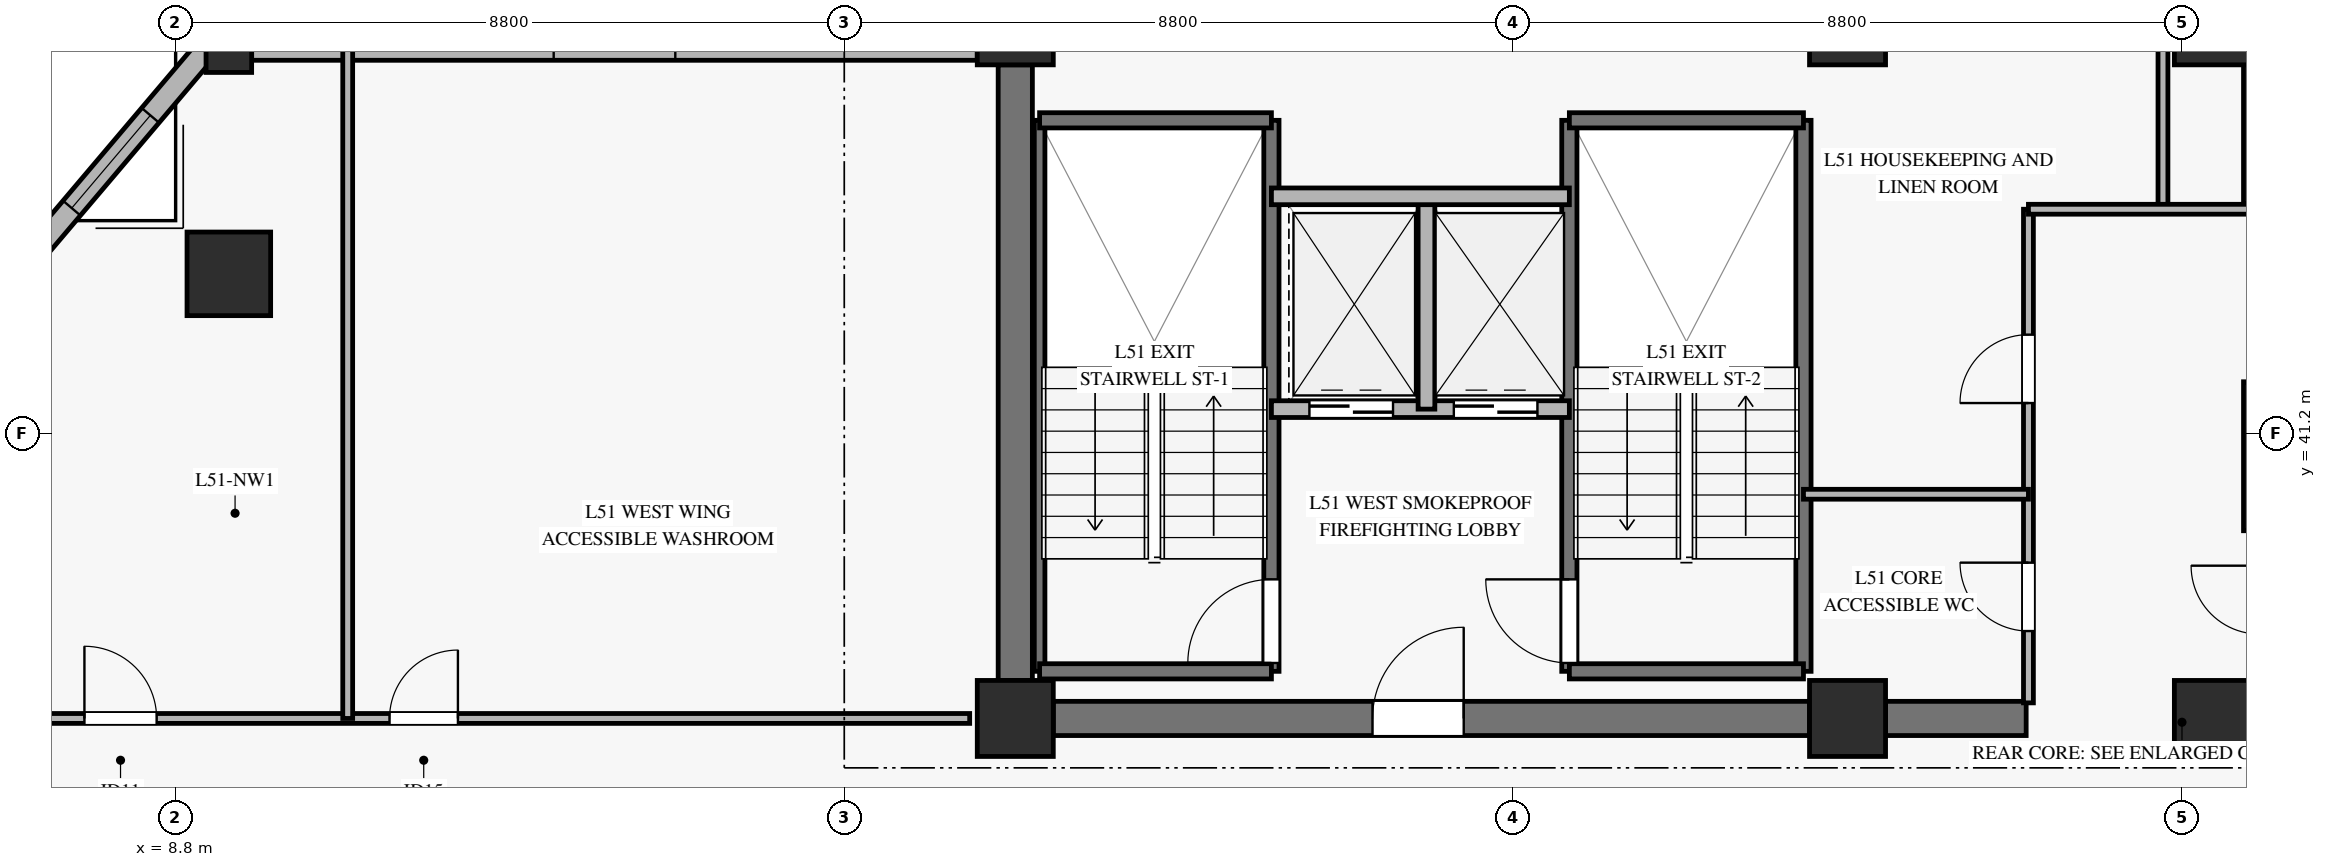
"""IFC4 building model, lengths in metres.
Left out: names, types, materials, properties, quantities, classifications, styles, units other than length and angle.
Written with IfcOpenShell. Run it as: python <this file> out.ifc"""

import sys

from ifc_helpers import new_model, si_unit, direction, frame, frame_2d, origin, origin_2d, place, context, subcontext, project, spatial, rectangle, hollow_rectangle, extrude, source, transform, mapped, element, fill, save


model = new_model("IFC4")
c1 = context("Model", 3, precision=1e-05, world=origin(), true_north=direction((0.0, 1.0)))
c2 = subcontext(c1, "Body", "Model", "MODEL_VIEW")
j1 = project(units=[si_unit("LENGTHUNIT", "METRE"), si_unit("PLANEANGLEUNIT", "RADIAN")], contexts=[c1])
p1 = place(None, origin())
s1 = spatial("IfcSite", under=j1, at=p1, CompositionType="ELEMENT")
p2 = place(p1, origin())
s2 = spatial("IfcBuilding", under=s1, at=p2, CompositionType="ELEMENT")
p3 = place(p2, frame((0.0, 0.0, 202.7)))
s3 = spatial("IfcBuildingStorey", under=s2, at=p3, CompositionType="ELEMENT", Elevation=202.7)
m1 = source(origin(), c2, "Body", "SweptSolid", [
    extrude(rectangle(XDim=1.0, YDim=1.0, at=origin_2d()), origin(), (0.0, 0.0, 1.0), 3.27),
])
for number, where, z_axis, x_axis in (
    (1, (19.85, 37.45, 0.0), (0.0, 0.0, 1.0), (1.0, 0.0, 0.0)),
    (2, (19.85, 46.55, 0.0), (0.0, 0.0, 1.0), (1.0, 0.0, 0.0)),
    (3, (30.8, 37.45, 0.0), (0.0, 0.0, 1.0), (1.0, 0.0, 0.0)),
    (4, (30.8, 46.55, 0.0), (0.0, 0.0, 1.0), (1.0, 0.0, 0.0)),
    (5, (35.6, 37.45, 0.0), (0.0, 0.0, 1.0), (1.0, 0.0, 0.0)),
    (6, (35.6, 46.55, 0.0), (0.0, 0.0, 1.0), (1.0, 0.0, 0.0)),
):
    element("IfcColumn", number, at=place(p3, frame(where, z_axis=z_axis, x_axis=x_axis)), inside=s3, PredefinedType="PILASTER", context=c2, shape_type="MappedRepresentation", body=[
        mapped(m1, transform((0.0, 0.0, 0.0), x_axis=(1.0, 0.0, 0.0), y_axis=(0.0, 1.0, 0.0), z_axis=(0.0, 0.0, 1.0), scale=1.0)),
    ])
p4 = place(p3, frame((20.35, 37.45, 0.0), z_axis=(0.0, 0.0, 1.0), x_axis=(1.0, 0.0, 0.0)))
e7 = element("IfcWall", 7, at=p4, inside=s3, PredefinedType="SHEAR", context=c2, shape_type="SweptSolid", body=[
    extrude(rectangle(XDim=9.95, YDim=0.45, at=frame_2d((4.975, 0.0))), origin(), (0.0, 0.0, 1.0), 3.27),
])
p5 = place(p4, frame((4.2, 0.0, 0.0)))
e8 = element("IfcOpeningElement", 8, at=p5, cuts=e7, PredefinedType="OPENING", context=c2, shape_type="SweptSolid", body=[
    extrude(rectangle(XDim=1.2, YDim=2.15, at=frame_2d((0.6, 1.075))), frame((0.0, 0.235, 0.0), z_axis=(0.0, -1.0, 0.0), x_axis=(1.0, 0.0, 0.0)), (0.0, 0.0, 1.0), 0.47),
])
p6 = place(p3, frame((31.3, 37.45, 0.0), z_axis=(0.0, 0.0, 1.0), x_axis=(1.0, 0.0, 0.0)))
e9 = element("IfcWall", 9, at=p6, inside=s3, PredefinedType="SHEAR", context=c2, shape_type="SweptSolid", body=[
    extrude(rectangle(XDim=1.85, YDim=0.45, at=frame_2d((0.925, 0.0))), origin(), (0.0, 0.0, 1.0), 3.27),
])
p7 = place(p3, frame((19.85, 37.95, 0.0), z_axis=(0.0, 0.0, 1.0), x_axis=(0.0, 1.0, 0.0)))
e10 = element("IfcWall", 10, at=p7, inside=s3, PredefinedType="SHEAR", context=c2, shape_type="SweptSolid", body=[
    extrude(rectangle(XDim=8.1, YDim=0.45, at=frame_2d((4.05, 0.0))), origin(), (0.0, 0.0, 1.0), 3.27),
])
m2 = source(origin(), c2, "Body", "SweptSolid", [
    extrude(hollow_rectangle(XDim=1.1, YDim=1.1, WallThickness=0.05, at=origin_2d()), origin(), (0.0, 0.0, 1.0), 3.27),
])
p8 = place(p3, frame((9.503, 43.3, 0.0), z_axis=(0.0, 0.0, 1.0), x_axis=(1.0, 0.0, 0.0)))
e11 = element("IfcColumn", 11, at=p8, inside=s3, PredefinedType="COLUMN", context=c2, shape_type="MappedRepresentation", body=[
    mapped(m2, transform((0.0, 0.0, 0.0), x_axis=(1.0, 0.0, 0.0), y_axis=(0.0, 1.0, 0.0), z_axis=(0.0, 0.0, 1.0), scale=1.0)),
])
m3 = source(origin(), c2, "Body", "SweptSolid", [
    extrude(hollow_rectangle(XDim=0.6, YDim=0.6, WallThickness=0.028, at=origin_2d()), origin(), (0.0, 0.0, 1.0), 3.27),
])
p9 = place(p3, frame((9.503, 46.25, 0.0), z_axis=(0.0, 0.0, 1.0), x_axis=(1.0, 0.0, 0.0)))
e12 = element("IfcColumn", 12, at=p9, inside=s3, PredefinedType="COLUMN", context=c2, shape_type="MappedRepresentation", body=[
    mapped(m3, transform((0.0, 0.0, 0.0), x_axis=(1.0, 0.0, 0.0), y_axis=(0.0, 1.0, 0.0), z_axis=(0.0, 0.0, 1.0), scale=1.0)),
])
p10 = place(p3, frame((9.803, 46.25, 0.0), z_axis=(0.0, 0.0, 1.0), x_axis=(1.0, 0.0, 0.0)))
e13 = element("IfcWall", 13, at=p10, inside=s3, PredefinedType="SOLIDWALL", context=c2, shape_type="SweptSolid", body=[
    extrude(rectangle(XDim=9.547, YDim=0.28, at=frame_2d((4.773, 0.0))), origin(), (0.0, 0.0, 1.0), 2.75),
])
p11 = place(p10, frame((3.974, 0.0, 0.45)))
e14 = element("IfcOpeningElement", 14, at=p11, cuts=e13, PredefinedType="OPENING", context=c2, shape_type="SweptSolid", body=[
    extrude(rectangle(XDim=1.6, YDim=2.0, at=frame_2d((0.8, 1.0))), frame((0.0, 0.15, 0.0), z_axis=(0.0, -1.0, 0.0), x_axis=(1.0, 0.0, 0.0)), (0.0, 0.0, 1.0), 0.3),
])
p12 = place(p3, frame((9.203, 46.25, 0.0), z_axis=(0.0, 0.0, 1.0), x_axis=(-0.646527923623, -0.762890322377, 0.0)))
e15 = element("IfcWall", 15, at=p12, inside=s3, PredefinedType="SOLIDWALL", context=c2, shape_type="SweptSolid", body=[
    extrude(rectangle(XDim=3.867, YDim=0.3, at=frame_2d((1.933, 0.0))), origin(), (0.0, 0.0, 1.0), 2.75),
])
p13 = place(p12, frame((1.133, 0.0, 0.45)))
e16 = element("IfcOpeningElement", 16, at=p13, cuts=e15, PredefinedType="OPENING", context=c2, shape_type="SweptSolid", body=[
    extrude(rectangle(XDim=1.6, YDim=2.0, at=frame_2d((0.8, 1.0))), frame((0.0, 0.16, 0.0), z_axis=(0.0, -1.0, 0.0), x_axis=(1.0, 0.0, 0.0)), (0.0, 0.0, 1.0), 0.32),
])
p14 = place(p3, frame((20.17, 38.07, 0.0), z_axis=(0.0, 0.0, 1.0), x_axis=(0.0, 1.0, 0.0)))
e17 = element("IfcWall", 17, at=p14, inside=s3, PredefinedType="SOLIDWALL", context=c2, shape_type="SweptSolid", body=[
    extrude(rectangle(XDim=7.25, YDim=0.14, at=frame_2d((3.625, 0.0))), origin(), (0.0, 0.0, 1.0), 3.5),
])
p15 = place(p3, frame((23.22, 38.07, 0.0), z_axis=(0.0, 0.0, 1.0), x_axis=(0.0, 1.0, 0.0)))
e18 = element("IfcWall", 18, at=p15, inside=s3, PredefinedType="SOLIDWALL", context=c2, shape_type="SweptSolid", body=[
    extrude(rectangle(XDim=7.25, YDim=0.2, at=frame_2d((3.625, 0.0))), origin(), (0.0, 0.0, 1.0), 3.5),
])
p16 = place(p15, frame((0.11, 0.0, 0.0)))
e19 = element("IfcOpeningElement", 19, at=p16, cuts=e18, PredefinedType="OPENING", context=c2, shape_type="SweptSolid", body=[
    extrude(rectangle(XDim=1.1, YDim=2.15, at=frame_2d((0.55, 1.075))), frame((0.0, 0.11, 0.0), z_axis=(0.0, -1.0, 0.0), x_axis=(1.0, 0.0, 0.0)), (0.0, 0.0, 1.0), 0.22),
])
for number, where, z_axis, x_axis in (
    (20, (20.17, 45.32, 0.0), (0.0, 0.0, 1.0), (1.0, 0.0, 0.0)),
    (21, (20.17, 38.07, 0.0), (0.0, 0.0, 1.0), (1.0, 0.0, 0.0)),
):
    element("IfcWall", number, at=place(p3, frame(where, z_axis=z_axis, x_axis=x_axis)), inside=s3, PredefinedType="SOLIDWALL", context=c2, shape_type="SweptSolid", body=[
        extrude(rectangle(XDim=3.05, YDim=0.2, at=frame_2d((1.525, 0.0))), origin(), (0.0, 0.0, 1.0), 3.5),
    ])
p17 = place(p3, frame((27.14, 38.07, 0.0), z_axis=(0.0, 0.0, 1.0), x_axis=(0.0, 1.0, 0.0)))
e22 = element("IfcWall", 22, at=p17, inside=s3, PredefinedType="SOLIDWALL", context=c2, shape_type="SweptSolid", body=[
    extrude(rectangle(XDim=7.25, YDim=0.2, at=frame_2d((3.625, 0.0))), origin(), (0.0, 0.0, 1.0), 3.5),
])
p18 = place(p17, frame((0.11, 0.0, 0.0)))
e23 = element("IfcOpeningElement", 23, at=p18, cuts=e22, PredefinedType="OPENING", context=c2, shape_type="SweptSolid", body=[
    extrude(rectangle(XDim=1.1, YDim=2.15, at=frame_2d((0.55, 1.075))), frame((0.0, 0.11, 0.0), z_axis=(0.0, -1.0, 0.0), x_axis=(1.0, 0.0, 0.0)), (0.0, 0.0, 1.0), 0.22),
])
p19 = place(p3, frame((30.22, 38.07, 0.0), z_axis=(0.0, 0.0, 1.0), x_axis=(0.0, 1.0, 0.0)))
e24 = element("IfcWall", 24, at=p19, inside=s3, PredefinedType="SOLIDWALL", context=c2, shape_type="SweptSolid", body=[
    extrude(rectangle(XDim=7.25, YDim=0.2, at=frame_2d((3.625, 0.0))), origin(), (0.0, 0.0, 1.0), 3.5),
])
for number, where, z_axis, x_axis in (
    (25, (27.14, 45.32, 0.0), (0.0, 0.0, 1.0), (1.0, 0.0, 0.0)),
    (26, (27.14, 38.07, 0.0), (0.0, 0.0, 1.0), (1.0, 0.0, 0.0)),
):
    element("IfcWall", number, at=place(p3, frame(where, z_axis=z_axis, x_axis=x_axis)), inside=s3, PredefinedType="SOLIDWALL", context=c2, shape_type="SweptSolid", body=[
        extrude(rectangle(XDim=3.08, YDim=0.2, at=frame_2d((1.54, 0.0))), origin(), (0.0, 0.0, 1.0), 3.5),
    ])
p20 = place(p3, frame((23.22, 41.52, 0.0), z_axis=(0.0, 0.0, 1.0), x_axis=(1.0, 0.0, 0.0)))
e27 = element("IfcWall", 27, at=p20, inside=s3, PredefinedType="SOLIDWALL", context=c2, shape_type="SweptSolid", body=[
    extrude(rectangle(XDim=3.92, YDim=0.22, at=frame_2d((1.96, 0.0))), origin(), (0.0, 0.0, 1.0), 3.27),
])
p21 = place(p20, frame((0.5, 0.0, 0.0)))
e28 = element("IfcOpeningElement", 28, at=p21, cuts=e27, PredefinedType="OPENING", context=c2, shape_type="SweptSolid", body=[
    extrude(rectangle(XDim=1.1, YDim=2.2, at=frame_2d((0.55, 1.1))), frame((0.0, 0.12, 0.0), z_axis=(0.0, -1.0, 0.0), x_axis=(1.0, 0.0, 0.0)), (0.0, 0.0, 1.0), 0.24),
])
p22 = place(p20, frame((2.4, 0.0, 0.0)))
e29 = element("IfcOpeningElement", 29, at=p22, cuts=e27, PredefinedType="OPENING", context=c2, shape_type="SweptSolid", body=[
    extrude(rectangle(XDim=1.1, YDim=2.2, at=frame_2d((0.55, 1.1))), frame((0.0, 0.12, 0.0), z_axis=(0.0, -1.0, 0.0), x_axis=(1.0, 0.0, 0.0)), (0.0, 0.0, 1.0), 0.24),
])
p23 = place(p3, frame((25.26, 41.52, 0.0), z_axis=(0.0, 0.0, 1.0), x_axis=(0.0, 1.0, 0.0)))
e30 = element("IfcWall", 30, at=p23, inside=s3, PredefinedType="SOLIDWALL", context=c2, shape_type="SweptSolid", body=[
    extrude(rectangle(XDim=2.8, YDim=0.22, at=frame_2d((1.4, 0.0))), origin(), (0.0, 0.0, 1.0), 3.27),
])
p24 = place(p3, frame((23.22, 44.32, 0.0), z_axis=(0.0, 0.0, 1.0), x_axis=(1.0, 0.0, 0.0)))
e31 = element("IfcWall", 31, at=p24, inside=s3, PredefinedType="SOLIDWALL", context=c2, shape_type="SweptSolid", body=[
    extrude(rectangle(XDim=3.92, YDim=0.22, at=frame_2d((1.96, 0.0))), origin(), (0.0, 0.0, 1.0), 3.27),
])
p25 = place(p3, frame((36.12, 39.92, 0.0), z_axis=(0.0, 0.0, 1.0), x_axis=(0.0, 1.0, 0.0)))
e32 = element("IfcWall", 32, at=p25, inside=s3, PredefinedType="SOLIDWALL", context=c2, shape_type="SweptSolid", body=[
    extrude(rectangle(XDim=1.96, YDim=0.22, at=frame_2d((0.98, 0.0))), origin(), (0.0, 0.0, 1.0), 3.27),
])
p26 = place(p3, frame((36.12, 44.22, 0.0), z_axis=(0.0, 0.0, 1.0), x_axis=(0.0, 1.0, 0.0)))
e33 = element("IfcWall", 33, at=p26, inside=s3, PredefinedType="SOLIDWALL", context=c2, shape_type="SweptSolid", body=[
    extrude(rectangle(XDim=2.125, YDim=0.22, at=frame_2d((1.062, 0.0))), origin(), (0.0, 0.0, 1.0), 3.27),
])
p27 = place(p3, frame((33.18, 37.655, 0.0), z_axis=(0.0, 0.0, 1.0), x_axis=(0.0, 1.0, 0.0)))
e34 = element("IfcWall", 34, at=p27, inside=s3, PredefinedType="PARTITIONING", context=c2, shape_type="SweptSolid", body=[
    extrude(rectangle(XDim=6.495, YDim=0.13, at=frame_2d((3.248, 0.0))), origin(), (0.0, 0.0, 1.0), 2.355),
])
p28 = place(p27, frame((0.945, 0.0, 0.0)))
e35 = element("IfcOpeningElement", 35, at=p28, cuts=e34, PredefinedType="OPENING", context=c2, shape_type="SweptSolid", body=[
    extrude(rectangle(XDim=0.9, YDim=2.1, at=frame_2d((0.45, 1.05))), frame((0.0, 0.075, 0.0), z_axis=(0.0, -1.0, 0.0), x_axis=(1.0, 0.0, 0.0)), (0.0, 0.0, 1.0), 0.15),
])
p29 = place(p27, frame((3.945, 0.0, 0.0)))
e36 = element("IfcOpeningElement", 36, at=p29, cuts=e34, PredefinedType="OPENING", context=c2, shape_type="SweptSolid", body=[
    extrude(rectangle(XDim=0.9, YDim=2.1, at=frame_2d((0.45, 1.05))), frame((0.0, 0.075, 0.0), z_axis=(0.0, -1.0, 0.0), x_axis=(1.0, 0.0, 0.0)), (0.0, 0.0, 1.0), 0.15),
])
p30 = place(p3, frame((34.95, 44.15, 0.0), z_axis=(0.0, 0.0, 1.0), x_axis=(0.0, 1.0, 0.0)))
e37 = element("IfcWall", 37, at=p30, inside=s3, PredefinedType="PARTITIONING", context=c2, shape_type="SweptSolid", body=[
    extrude(rectangle(XDim=2.195, YDim=0.13, at=frame_2d((1.098, 0.0))), origin(), (0.0, 0.0, 1.0), 3.27),
])
p31 = place(p3, frame((33.18, 44.15, 0.0), z_axis=(0.0, 0.0, 1.0), x_axis=(1.0, 0.0, 0.0)))
e38 = element("IfcWall", 38, at=p31, inside=s3, PredefinedType="PARTITIONING", context=c2, shape_type="SweptSolid", body=[
    extrude(rectangle(XDim=2.97, YDim=0.13, at=frame_2d((1.485, 0.0))), origin(), (0.0, 0.0, 1.0), 2.555),
])
p32 = place(p3, frame((30.22, 40.4, 0.0), z_axis=(0.0, 0.0, 1.0), x_axis=(1.0, 0.0, 0.0)))
e39 = element("IfcWall", 39, at=p32, inside=s3, PredefinedType="PARTITIONING", context=c2, shape_type="SweptSolid", body=[
    extrude(rectangle(XDim=2.96, YDim=0.13, at=frame_2d((1.48, 0.0))), origin(), (0.0, 0.0, 1.0), 2.555),
])
p33 = place(p3, frame((6.703, 37.45, 0.0), z_axis=(0.0, 0.0, 1.0), x_axis=(1.0, 0.0, 0.0)))
e40 = element("IfcWall", 40, at=p33, inside=s3, PredefinedType="PARTITIONING", context=c2, shape_type="SweptSolid", body=[
    extrude(rectangle(XDim=12.547, YDim=0.13, at=frame_2d((6.273, 0.0))), origin(), (0.0, 0.0, 1.0), 2.755),
])
p34 = place(p33, frame((0.9, 0.0, 0.0)))
e41 = element("IfcOpeningElement", 41, at=p34, cuts=e40, PredefinedType="OPENING", context=c2, shape_type="SweptSolid", body=[
    extrude(rectangle(XDim=0.95, YDim=2.1, at=frame_2d((0.475, 1.05))), frame((0.0, 0.075, 0.0), z_axis=(0.0, -1.0, 0.0), x_axis=(1.0, 0.0, 0.0)), (0.0, 0.0, 1.0), 0.15),
])
p35 = place(p33, frame((4.914, 0.0, 0.0)))
e42 = element("IfcOpeningElement", 42, at=p35, cuts=e40, PredefinedType="OPENING", context=c2, shape_type="SweptSolid", body=[
    extrude(rectangle(XDim=0.9, YDim=2.1, at=frame_2d((0.45, 1.05))), frame((0.0, 0.075, 0.0), z_axis=(0.0, -1.0, 0.0), x_axis=(1.0, 0.0, 0.0)), (0.0, 0.0, 1.0), 0.15),
])
p36 = place(p3, frame((11.067, 37.45, 0.0), z_axis=(0.0, 0.0, 1.0), x_axis=(0.0, 1.0, 0.0)))
e43 = element("IfcWall", 43, at=p36, inside=s3, PredefinedType="PARTITIONING", context=c2, shape_type="SweptSolid", body=[
    extrude(rectangle(XDim=8.8, YDim=0.13, at=frame_2d((4.4, 0.0))), origin(), (0.0, 0.0, 1.0), 3.27),
])
m4 = source(origin(), c2, "Body", "SweptSolid", [
    extrude(rectangle(XDim=1.6, YDim=2.0, at=frame_2d((0.8, 1.0))), frame((0.0, 0.03, 0.0), z_axis=(0.0, -1.0, 0.0), x_axis=(1.0, 0.0, 0.0)), (0.0, 0.0, 1.0), 0.06),
])
p37 = place(p13, origin())
e44 = element("IfcWindow", 44, at=p37, inside=s3, PartitioningType="SINGLE_PANEL", PredefinedType="WINDOW", context=c2, shape_type="MappedRepresentation", body=[
    mapped(m4, transform((0.0, 0.0, 0.0), x_axis=(1.0, 0.0, 0.0), y_axis=(0.0, 1.0, 0.0), z_axis=(0.0, 0.0, 1.0), scale=1.0)),
])
fill(e16, e44)
m5 = source(origin(), c2, "Body", "SweptSolid", [
    extrude(rectangle(XDim=1.1, YDim=2.15, at=frame_2d((0.55, 1.075))), frame((0.0, 0.025, 0.0), z_axis=(0.0, -1.0, 0.0), x_axis=(1.0, 0.0, 0.0)), (0.0, 0.0, 1.0), 0.05),
])
p38 = place(p16, origin())
e45 = element("IfcDoor", 45, at=p38, inside=s3, OperationType="SINGLE_SWING_LEFT", PredefinedType="DOOR", context=c2, shape_type="MappedRepresentation", body=[
    mapped(m5, transform((0.0, 0.0, 0.0), x_axis=(1.0, 0.0, 0.0), y_axis=(0.0, 1.0, 0.0), z_axis=(0.0, 0.0, 1.0), scale=1.0)),
])
fill(e19, e45)
p39 = place(p18, origin())
e46 = element("IfcDoor", 46, at=p39, inside=s3, OperationType="SINGLE_SWING_RIGHT", PredefinedType="DOOR", context=c2, shape_type="MappedRepresentation", body=[
    mapped(m5, transform((0.0, 0.0, 0.0), x_axis=(1.0, 0.0, 0.0), y_axis=(0.0, 1.0, 0.0), z_axis=(0.0, 0.0, 1.0), scale=1.0)),
])
fill(e23, e46)
m6 = source(origin(), c2, "Body", "SweptSolid", [
    extrude(rectangle(XDim=1.1, YDim=2.2, at=frame_2d((0.55, 1.1))), frame((0.0, 0.025, 0.0), z_axis=(0.0, -1.0, 0.0), x_axis=(1.0, 0.0, 0.0)), (0.0, 0.0, 1.0), 0.05),
])
p40 = place(p21, origin())
e47 = element("IfcDoor", 47, at=p40, inside=s3, OperationType="SLIDING_TO_LEFT", PredefinedType="DOOR", context=c2, shape_type="MappedRepresentation", body=[
    mapped(m6, transform((0.0, 0.0, 0.0), x_axis=(1.0, 0.0, 0.0), y_axis=(0.0, 1.0, 0.0), z_axis=(0.0, 0.0, 1.0), scale=1.0)),
])
fill(e28, e47)
p41 = place(p22, origin())
e48 = element("IfcDoor", 48, at=p41, inside=s3, OperationType="SLIDING_TO_LEFT", PredefinedType="DOOR", context=c2, shape_type="MappedRepresentation", body=[
    mapped(m6, transform((0.0, 0.0, 0.0), x_axis=(1.0, 0.0, 0.0), y_axis=(0.0, 1.0, 0.0), z_axis=(0.0, 0.0, 1.0), scale=1.0)),
])
fill(e29, e48)
m7 = source(origin(), c2, "Body", "SweptSolid", [
    extrude(rectangle(XDim=1.2, YDim=2.15, at=frame_2d((0.6, 1.075))), frame((0.0, 0.025, 0.0), z_axis=(0.0, -1.0, 0.0), x_axis=(1.0, 0.0, 0.0)), (0.0, 0.0, 1.0), 0.05),
])
p42 = place(p5, origin())
e49 = element("IfcDoor", 49, at=p42, inside=s3, OperationType="SINGLE_SWING_RIGHT", PredefinedType="DOOR", context=c2, shape_type="MappedRepresentation", body=[
    mapped(m7, transform((0.0, 0.0, 0.0), x_axis=(1.0, 0.0, 0.0), y_axis=(0.0, 1.0, 0.0), z_axis=(0.0, 0.0, 1.0), scale=1.0)),
])
fill(e8, e49)
m8 = source(origin(), c2, "Body", "SweptSolid", [
    extrude(rectangle(XDim=0.9, YDim=2.1, at=frame_2d((0.45, 1.05))), frame((0.0, 0.025, 0.0), z_axis=(0.0, -1.0, 0.0), x_axis=(1.0, 0.0, 0.0)), (0.0, 0.0, 1.0), 0.05),
])
p43 = place(p28, origin())
e50 = element("IfcDoor", 50, at=p43, inside=s3, OperationType="SINGLE_SWING_RIGHT", PredefinedType="DOOR", context=c2, shape_type="MappedRepresentation", body=[
    mapped(m8, transform((0.0, 0.0, 0.0), x_axis=(1.0, 0.0, 0.0), y_axis=(0.0, 1.0, 0.0), z_axis=(0.0, 0.0, 1.0), scale=1.0)),
])
fill(e35, e50)
p44 = place(p29, origin())
e51 = element("IfcDoor", 51, at=p44, inside=s3, OperationType="SINGLE_SWING_LEFT", PredefinedType="DOOR", context=c2, shape_type="MappedRepresentation", body=[
    mapped(m8, transform((0.0, 0.0, 0.0), x_axis=(1.0, 0.0, 0.0), y_axis=(0.0, 1.0, 0.0), z_axis=(0.0, 0.0, 1.0), scale=1.0)),
])
fill(e36, e51)
m9 = source(origin(), c2, "Body", "SweptSolid", [
    extrude(rectangle(XDim=0.95, YDim=2.1, at=frame_2d((0.475, 1.05))), frame((0.0, 0.025, 0.0), z_axis=(0.0, -1.0, 0.0), x_axis=(1.0, 0.0, 0.0)), (0.0, 0.0, 1.0), 0.05),
])
p45 = place(p34, origin())
e52 = element("IfcDoor", 52, at=p45, inside=s3, OperationType="SINGLE_SWING_LEFT", PredefinedType="DOOR", context=c2, shape_type="MappedRepresentation", body=[
    mapped(m9, transform((0.0, 0.0, 0.0), x_axis=(1.0, 0.0, 0.0), y_axis=(0.0, 1.0, 0.0), z_axis=(0.0, 0.0, 1.0), scale=1.0)),
])
fill(e41, e52)
p46 = place(p35, origin())
e53 = element("IfcDoor", 53, at=p46, inside=s3, OperationType="SINGLE_SWING_RIGHT", PredefinedType="DOOR", context=c2, shape_type="MappedRepresentation", body=[
    mapped(m8, transform((0.0, 0.0, 0.0), x_axis=(1.0, 0.0, 0.0), y_axis=(0.0, 1.0, 0.0), z_axis=(0.0, 0.0, 1.0), scale=1.0)),
])
fill(e42, e53)
save(model, sys.argv[1])
